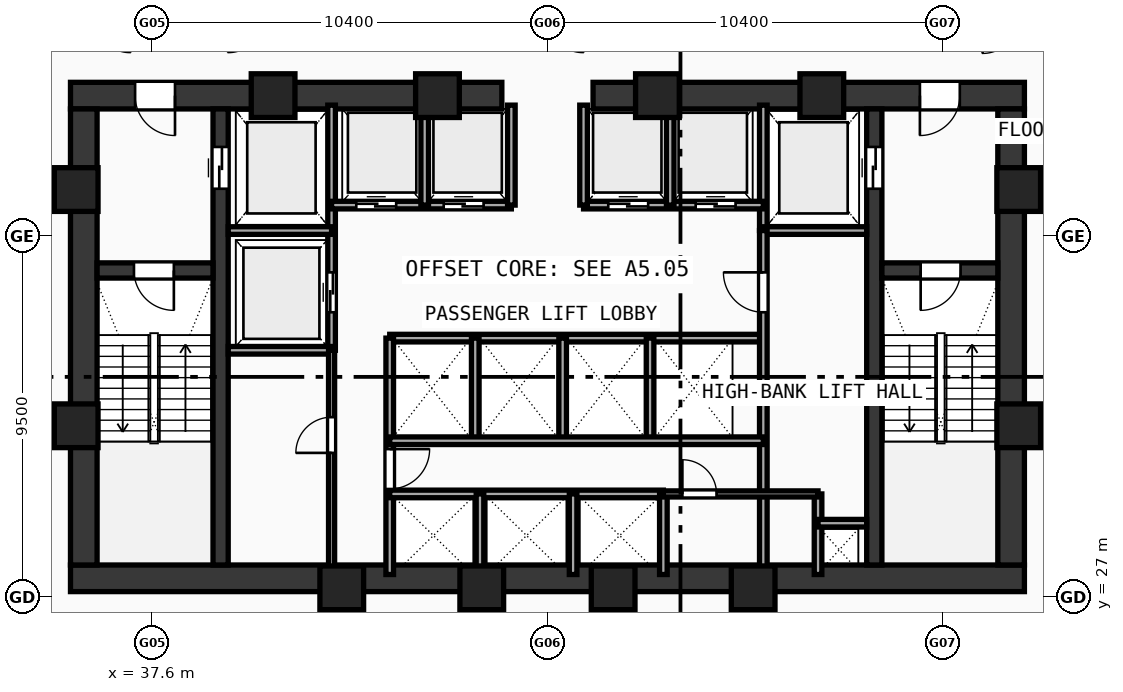
"""IFC4 building model, lengths in metres.
Left out: names, types, materials, properties, quantities, classifications, styles, units other than length and angle.
Written with IfcOpenShell. Run it as: python <this file> out.ifc"""

import sys

from ifc_helpers import new_model, si_unit, direction, frame, frame_2d, origin, origin_with_axes, origin_2d, place, context, subcontext, project, spatial, rectangle, hollow_rectangle, extrude, source, transform, mapped, element, fill, save


model = new_model("IFC4")
c1 = context("Model", 3, precision=1e-05, world=origin(), true_north=direction((0.0, 1.0)))
c2 = subcontext(c1, "Body", "Model", "MODEL_VIEW")
j1 = project(units=[si_unit("LENGTHUNIT", "METRE"), si_unit("PLANEANGLEUNIT", "RADIAN")], contexts=[c1])
p1 = place(None, origin())
s1 = spatial("IfcSite", under=j1, at=p1, CompositionType="ELEMENT")
p2 = place(p1, origin())
s2 = spatial("IfcBuilding", under=s1, at=p2, CompositionType="ELEMENT")
p3 = place(p2, frame((0.0, 0.0, 30.4)))
s3 = spatial("IfcBuildingStorey", under=s2, at=p3, CompositionType="ELEMENT", Elevation=30.4)
p4 = place(p3, frame((35.45, 27.5, 0.0), z_axis=(0.0, 0.0, 1.0), x_axis=(1.0, 0.0, 0.0)))
e1 = element("IfcWall", 1, at=p4, inside=s3, PredefinedType="SHEAR", context=c2, shape_type="SweptSolid", body=[
    extrude(rectangle(XDim=25.1, YDim=0.7, at=frame_2d((12.55, 0.0))), origin(), (0.0, 0.0, 1.0), 3.37),
])
p5 = place(p3, frame((35.45, 40.2, 0.0), z_axis=(0.0, 0.0, 1.0), x_axis=(1.0, 0.0, 0.0)))
e2 = element("IfcWall", 2, at=p5, inside=s3, PredefinedType="SHEAR", context=c2, shape_type="SweptSolid", body=[
    extrude(rectangle(XDim=11.35, YDim=0.7, at=frame_2d((5.675, 0.0))), origin(), (0.0, 0.0, 1.0), 3.37),
])
p6 = place(p5, frame((1.7, 0.0, 0.0)))
e3 = element("IfcOpeningElement", 3, at=p6, cuts=e2, PredefinedType="OPENING", context=c2, shape_type="SweptSolid", body=[
    extrude(rectangle(XDim=1.05, YDim=2.1, at=frame_2d((0.525, 1.05))), frame((0.0, 0.36, 0.0), z_axis=(0.0, -1.0, 0.0), x_axis=(1.0, 0.0, 0.0)), (0.0, 0.0, 1.0), 0.72),
])
p7 = place(p3, frame((49.2, 40.2, 0.0), z_axis=(0.0, 0.0, 1.0), x_axis=(1.0, 0.0, 0.0)))
e4 = element("IfcWall", 4, at=p7, inside=s3, PredefinedType="SHEAR", context=c2, shape_type="SweptSolid", body=[
    extrude(rectangle(XDim=11.35, YDim=0.7, at=frame_2d((5.675, 0.0))), origin(), (0.0, 0.0, 1.0), 3.37),
])
p8 = place(p7, frame((8.6, 0.0, 0.0)))
e5 = element("IfcOpeningElement", 5, at=p8, cuts=e4, PredefinedType="OPENING", context=c2, shape_type="SweptSolid", body=[
    extrude(rectangle(XDim=1.05, YDim=2.1, at=frame_2d((0.525, 1.05))), frame((0.0, 0.36, 0.0), z_axis=(0.0, -1.0, 0.0), x_axis=(1.0, 0.0, 0.0)), (0.0, 0.0, 1.0), 0.72),
])
for number, where, z_axis, x_axis in (
    (6, (35.8, 27.85, 0.0), (0.0, 0.0, 1.0), (0.0, 1.0, 0.0)),
    (7, (60.2, 27.85, 0.0), (0.0, 0.0, 1.0), (0.0, 1.0, 0.0)),
):
    element("IfcWall", number, at=place(p3, frame(where, z_axis=z_axis, x_axis=x_axis)), inside=s3, PredefinedType="SHEAR", context=c2, shape_type="SweptSolid", body=[
        extrude(rectangle(XDim=12.0, YDim=0.7, at=frame_2d((6.0, 0.0))), origin(), (0.0, 0.0, 1.0), 3.37),
    ])
p9 = place(p3, frame((39.4, 27.85, 0.0), z_axis=(0.0, 0.0, 1.0), x_axis=(0.0, 1.0, 0.0)))
e8 = element("IfcWall", 8, at=p9, inside=s3, PredefinedType="SHEAR", context=c2, shape_type="SweptSolid", body=[
    extrude(rectangle(XDim=12.0, YDim=0.4, at=frame_2d((6.0, 0.0))), origin(), (0.0, 0.0, 1.0), 3.37),
])
p10 = place(p9, frame((9.9, 0.0, 0.0)))
e9 = element("IfcOpeningElement", 9, at=p10, cuts=e8, PredefinedType="OPENING", context=c2, shape_type="SweptSolid", body=[
    extrude(rectangle(XDim=1.1, YDim=2.1, at=frame_2d((0.55, 1.05))), frame((0.0, 0.21, 0.0), z_axis=(0.0, -1.0, 0.0), x_axis=(1.0, 0.0, 0.0)), (0.0, 0.0, 1.0), 0.42),
])
p11 = place(p3, frame((56.6, 27.85, 0.0), z_axis=(0.0, 0.0, 1.0), x_axis=(0.0, 1.0, 0.0)))
e10 = element("IfcWall", 10, at=p11, inside=s3, PredefinedType="SHEAR", context=c2, shape_type="SweptSolid", body=[
    extrude(rectangle(XDim=12.0, YDim=0.4, at=frame_2d((6.0, 0.0))), origin(), (0.0, 0.0, 1.0), 3.37),
])
p12 = place(p11, frame((9.9, 0.0, 0.0)))
e11 = element("IfcOpeningElement", 11, at=p12, cuts=e10, PredefinedType="OPENING", context=c2, shape_type="SweptSolid", body=[
    extrude(rectangle(XDim=1.1, YDim=2.1, at=frame_2d((0.55, 1.05))), frame((0.0, 0.21, 0.0), z_axis=(0.0, -1.0, 0.0), x_axis=(1.0, 0.0, 0.0)), (0.0, 0.0, 1.0), 0.42),
])
p13 = place(p3, frame((36.15, 35.6, 0.0), z_axis=(0.0, 0.0, 1.0), x_axis=(1.0, 0.0, 0.0)))
e12 = element("IfcWall", 12, at=p13, inside=s3, PredefinedType="SHEAR", context=c2, shape_type="SweptSolid", body=[
    extrude(rectangle(XDim=3.05, YDim=0.4, at=frame_2d((1.525, 0.0))), origin(), (0.0, 0.0, 1.0), 3.37),
])
p14 = place(p13, frame((0.97, 0.0, 0.0)))
e13 = element("IfcOpeningElement", 13, at=p14, cuts=e12, PredefinedType="OPENING", context=c2, shape_type="SweptSolid", body=[
    extrude(rectangle(XDim=1.05, YDim=2.1, at=frame_2d((0.525, 1.05))), frame((0.0, 0.21, 0.0), z_axis=(0.0, -1.0, 0.0), x_axis=(1.0, 0.0, 0.0)), (0.0, 0.0, 1.0), 0.42),
])
p15 = place(p3, frame((56.8, 35.6, 0.0), z_axis=(0.0, 0.0, 1.0), x_axis=(1.0, 0.0, 0.0)))
e14 = element("IfcWall", 14, at=p15, inside=s3, PredefinedType="SHEAR", context=c2, shape_type="SweptSolid", body=[
    extrude(rectangle(XDim=3.05, YDim=0.4, at=frame_2d((1.525, 0.0))), origin(), (0.0, 0.0, 1.0), 3.37),
])
p16 = place(p15, frame((1.02, 0.0, 0.0)))
e15 = element("IfcOpeningElement", 15, at=p16, cuts=e14, PredefinedType="OPENING", context=c2, shape_type="SweptSolid", body=[
    extrude(rectangle(XDim=1.05, YDim=2.1, at=frame_2d((0.525, 1.05))), frame((0.0, 0.21, 0.0), z_axis=(0.0, -1.0, 0.0), x_axis=(1.0, 0.0, 0.0)), (0.0, 0.0, 1.0), 0.42),
])
m1 = source(origin(), c2, "Body", "SweptSolid", [
    extrude(hollow_rectangle(XDim=1.15, YDim=1.15, WallThickness=0.048, at=origin_2d()), origin(), (0.0, 0.0, 1.0), 3.63),
])
for number, where, z_axis, x_axis in (
    (16, (42.588, 27.25, -0.26), (0.0, 0.0, 1.0), (1.0, 0.0, 0.0)),
    (17, (46.272, 27.25, -0.26), (0.0, 0.0, 1.0), (1.0, 0.0, 0.0)),
    (18, (49.729, 27.25, -0.26), (0.0, 0.0, 1.0), (1.0, 0.0, 0.0)),
    (19, (53.412, 27.25, -0.26), (0.0, 0.0, 1.0), (1.0, 0.0, 0.0)),
    (20, (60.4, 31.513, -0.26), (0.0, 0.0, 1.0), (1.0, 0.0, 0.0)),
    (21, (60.4, 37.729, -0.26), (0.0, 0.0, 1.0), (1.0, 0.0, 0.0)),
    (22, (55.219, 40.2, -0.26), (0.0, 0.0, 1.0), (1.0, 0.0, 0.0)),
    (23, (50.894, 40.2, -0.26), (0.0, 0.0, 1.0), (1.0, 0.0, 0.0)),
    (24, (45.106, 40.2, -0.26), (0.0, 0.0, 1.0), (1.0, 0.0, 0.0)),
    (25, (40.781, 40.2, -0.26), (0.0, 0.0, 1.0), (1.0, 0.0, 0.0)),
    (26, (35.6, 37.729, -0.26), (0.0, 0.0, 1.0), (1.0, 0.0, 0.0)),
    (27, (35.6, 31.513, -0.26), (0.0, 0.0, 1.0), (1.0, 0.0, 0.0)),
):
    element("IfcColumn", number, at=place(p3, frame(where, z_axis=z_axis, x_axis=x_axis)), inside=s3, PredefinedType="COLUMN", context=c2, shape_type="MappedRepresentation", body=[
        mapped(m1, transform((0.0, 0.0, 0.0), scale=1.0)),
    ])
p17 = place(p3, frame((42.32, 33.5, 0.0), z_axis=(0.0, 0.0, 1.0), x_axis=(0.0, 1.0, 0.0)))
e28 = element("IfcWall", 28, at=p17, inside=s3, PredefinedType="SOLIDWALL", context=c2, shape_type="SweptSolid", body=[
    extrude(rectangle(XDim=6.45, YDim=0.2, at=frame_2d((3.225, 0.0))), origin(), (0.0, 0.0, 1.0), 3.37),
])
p18 = place(p17, frame((1.0, 0.0, 0.0)))
e29 = element("IfcOpeningElement", 29, at=p18, cuts=e28, PredefinedType="OPENING", context=c2, shape_type="SweptSolid", body=[
    extrude(rectangle(XDim=1.05, YDim=2.1, at=frame_2d((0.525, 1.05))), frame((0.0, 0.11, 0.0), z_axis=(0.0, -1.0, 0.0), x_axis=(1.0, 0.0, 0.0)), (0.0, 0.0, 1.0), 0.22),
])
for number, where, z_axis, x_axis in (
    (30, (39.6, 36.65, 0.0), (0.0, 0.0, 1.0), (1.0, 0.0, 0.0)),
    (31, (39.6, 33.5, 0.0), (0.0, 0.0, 1.0), (1.0, 0.0, 0.0)),
):
    element("IfcWall", number, at=place(p3, frame(where, z_axis=z_axis, x_axis=x_axis)), inside=s3, PredefinedType="SOLIDWALL", context=c2, shape_type="SweptSolid", body=[
        extrude(rectangle(XDim=2.72, YDim=0.2, at=frame_2d((1.36, 0.0))), origin(), (0.0, 0.0, 1.0), 3.37),
    ])
p19 = place(p3, frame((53.68, 36.65, 0.0), z_axis=(0.0, 0.0, 1.0), x_axis=(0.0, 1.0, 0.0)))
e32 = element("IfcWall", 32, at=p19, inside=s3, PredefinedType="SOLIDWALL", context=c2, shape_type="SweptSolid", body=[
    extrude(rectangle(XDim=3.3, YDim=0.2, at=frame_2d((1.65, 0.0))), origin(), (0.0, 0.0, 1.0), 3.37),
])
p20 = place(p3, frame((53.68, 36.65, 0.0), z_axis=(0.0, 0.0, 1.0), x_axis=(1.0, 0.0, 0.0)))
e33 = element("IfcWall", 33, at=p20, inside=s3, PredefinedType="SOLIDWALL", context=c2, shape_type="SweptSolid", body=[
    extrude(rectangle(XDim=2.72, YDim=0.2, at=frame_2d((1.36, 0.0))), origin(), (0.0, 0.0, 1.0), 3.37),
])
p21 = place(p3, frame((42.32, 37.32, 0.0), z_axis=(0.0, 0.0, 1.0), x_axis=(1.0, 0.0, 0.0)))
e34 = element("IfcWall", 34, at=p21, inside=s3, PredefinedType="SOLIDWALL", context=c2, shape_type="SweptSolid", body=[
    extrude(rectangle(XDim=4.73, YDim=0.2, at=frame_2d((2.365, 0.0))), origin(), (0.0, 0.0, 1.0), 3.37),
])
p22 = place(p21, frame((0.65, 0.0, 0.0)))
e35 = element("IfcOpeningElement", 35, at=p22, cuts=e34, PredefinedType="OPENING", context=c2, shape_type="SweptSolid", body=[
    extrude(rectangle(XDim=1.05, YDim=2.1, at=frame_2d((0.525, 1.05))), frame((0.0, 0.11, 0.0), z_axis=(0.0, -1.0, 0.0), x_axis=(1.0, 0.0, 0.0)), (0.0, 0.0, 1.0), 0.22),
])
p23 = place(p21, frame((2.95, 0.0, 0.0)))
e36 = element("IfcOpeningElement", 36, at=p23, cuts=e34, PredefinedType="OPENING", context=c2, shape_type="SweptSolid", body=[
    extrude(rectangle(XDim=1.05, YDim=2.1, at=frame_2d((0.525, 1.05))), frame((0.0, 0.11, 0.0), z_axis=(0.0, -1.0, 0.0), x_axis=(1.0, 0.0, 0.0)), (0.0, 0.0, 1.0), 0.22),
])
p24 = place(p3, frame((48.95, 37.32, 0.0), z_axis=(0.0, 0.0, 1.0), x_axis=(1.0, 0.0, 0.0)))
e37 = element("IfcWall", 37, at=p24, inside=s3, PredefinedType="SOLIDWALL", context=c2, shape_type="SweptSolid", body=[
    extrude(rectangle(XDim=4.73, YDim=0.2, at=frame_2d((2.365, 0.0))), origin(), (0.0, 0.0, 1.0), 3.37),
])
p25 = place(p24, frame((0.65, 0.0, 0.0)))
e38 = element("IfcOpeningElement", 38, at=p25, cuts=e37, PredefinedType="OPENING", context=c2, shape_type="SweptSolid", body=[
    extrude(rectangle(XDim=1.05, YDim=2.1, at=frame_2d((0.525, 1.05))), frame((0.0, 0.11, 0.0), z_axis=(0.0, -1.0, 0.0), x_axis=(1.0, 0.0, 0.0)), (0.0, 0.0, 1.0), 0.22),
])
p26 = place(p24, frame((2.95, 0.0, 0.0)))
e39 = element("IfcOpeningElement", 39, at=p26, cuts=e37, PredefinedType="OPENING", context=c2, shape_type="SweptSolid", body=[
    extrude(rectangle(XDim=1.05, YDim=2.1, at=frame_2d((0.525, 1.05))), frame((0.0, 0.11, 0.0), z_axis=(0.0, -1.0, 0.0), x_axis=(1.0, 0.0, 0.0)), (0.0, 0.0, 1.0), 0.22),
])
for number, where, z_axis, x_axis in (
    (40, (47.05, 37.32, 0.0), (0.0, 0.0, 1.0), (0.0, 1.0, 0.0)),
    (41, (48.95, 37.32, 0.0), (0.0, 0.0, 1.0), (0.0, 1.0, 0.0)),
    (42, (44.77, 37.32, 0.0), (0.0, 0.0, 1.0), (0.0, 1.0, 0.0)),
    (43, (51.23, 37.32, 0.0), (0.0, 0.0, 1.0), (0.0, 1.0, 0.0)),
):
    element("IfcWall", number, at=place(p3, frame(where, z_axis=z_axis, x_axis=x_axis)), inside=s3, PredefinedType="SOLIDWALL", context=c2, shape_type="SweptSolid", body=[
        extrude(rectangle(XDim=2.63, YDim=0.2, at=frame_2d((1.315, 0.0))), origin(), (0.0, 0.0, 1.0), 3.37),
    ])
p27 = place(p3, frame((43.85, 33.82, 0.0), z_axis=(0.0, 0.0, 1.0), x_axis=(1.0, 0.0, 0.0)))
e44 = element("IfcWall", 44, at=p27, inside=s3, PredefinedType="SOLIDWALL", context=c2, shape_type="SweptSolid", body=[
    extrude(rectangle(XDim=9.83, YDim=0.2, at=frame_2d((4.915, 0.0))), origin(), (0.0, 0.0, 1.0), 3.37),
])
p28 = place(p3, frame((43.85, 27.6, 0.0), z_axis=(0.0, 0.0, 1.0), x_axis=(0.0, 1.0, 0.0)))
e45 = element("IfcWall", 45, at=p28, inside=s3, PredefinedType="SOLIDWALL", context=c2, shape_type="SweptSolid", body=[
    extrude(rectangle(XDim=6.22, YDim=0.2, at=frame_2d((3.11, 0.0))), origin(), (0.0, 0.0, 1.0), 3.37),
])
p29 = place(p28, frame((2.25, 0.0, 0.0)))
e46 = element("IfcOpeningElement", 46, at=p29, cuts=e45, PredefinedType="OPENING", context=c2, shape_type="SweptSolid", body=[
    extrude(rectangle(XDim=1.05, YDim=2.1, at=frame_2d((0.525, 1.05))), frame((0.0, 0.11, 0.0), z_axis=(0.0, -1.0, 0.0), x_axis=(1.0, 0.0, 0.0)), (0.0, 0.0, 1.0), 0.22),
])
p30 = place(p3, frame((53.68, 27.6, 0.0), z_axis=(0.0, 0.0, 1.0), x_axis=(0.0, 1.0, 0.0)))
e47 = element("IfcWall", 47, at=p30, inside=s3, PredefinedType="SOLIDWALL", context=c2, shape_type="SweptSolid", body=[
    extrude(rectangle(XDim=9.05, YDim=0.2, at=frame_2d((4.525, 0.0))), origin(), (0.0, 0.0, 1.0), 3.37),
])
p31 = place(p30, frame((6.9, 0.0, 0.0)))
e48 = element("IfcOpeningElement", 48, at=p31, cuts=e47, PredefinedType="OPENING", context=c2, shape_type="SweptSolid", body=[
    extrude(rectangle(XDim=1.05, YDim=2.1, at=frame_2d((0.525, 1.05))), frame((0.0, 0.11, 0.0), z_axis=(0.0, -1.0, 0.0), x_axis=(1.0, 0.0, 0.0)), (0.0, 0.0, 1.0), 0.22),
])
for number, where, z_axis, x_axis in (
    (49, (46.1, 31.12, 0.0), (0.0, 0.0, 1.0), (0.0, 1.0, 0.0)),
    (50, (48.4, 31.12, 0.0), (0.0, 0.0, 1.0), (0.0, 1.0, 0.0)),
    (51, (50.7, 31.12, 0.0), (0.0, 0.0, 1.0), (0.0, 1.0, 0.0)),
):
    element("IfcWall", number, at=place(p3, frame(where, z_axis=z_axis, x_axis=x_axis)), inside=s3, PredefinedType="SOLIDWALL", context=c2, shape_type="SweptSolid", body=[
        extrude(rectangle(XDim=2.7, YDim=0.2, at=frame_2d((1.35, 0.0))), origin(), (0.0, 0.0, 1.0), 3.37),
    ])
p32 = place(p3, frame((43.85, 29.72, 0.0), z_axis=(0.0, 0.0, 1.0), x_axis=(1.0, 0.0, 0.0)))
e52 = element("IfcWall", 52, at=p32, inside=s3, PredefinedType="SOLIDWALL", context=c2, shape_type="SweptSolid", body=[
    extrude(rectangle(XDim=7.2, YDim=0.2, at=frame_2d((3.6, 0.0))), origin(), (0.0, 0.0, 1.0), 3.37),
])
p33 = place(p3, frame((51.05, 27.6, 0.0), z_axis=(0.0, 0.0, 1.0), x_axis=(0.0, 1.0, 0.0)))
e53 = element("IfcWall", 53, at=p33, inside=s3, PredefinedType="SOLIDWALL", context=c2, shape_type="SweptSolid", body=[
    extrude(rectangle(XDim=2.12, YDim=0.2, at=frame_2d((1.06, 0.0))), origin(), (0.0, 0.0, 1.0), 3.37),
])
p34 = place(p3, frame((43.85, 31.12, 0.0), z_axis=(0.0, 0.0, 1.0), x_axis=(1.0, 0.0, 0.0)))
e54 = element("IfcWall", 54, at=p34, inside=s3, PredefinedType="SOLIDWALL", context=c2, shape_type="SweptSolid", body=[
    extrude(rectangle(XDim=9.83, YDim=0.2, at=frame_2d((4.915, 0.0))), origin(), (0.0, 0.0, 1.0), 3.37),
])
for number, where, z_axis, x_axis in (
    (55, (46.225, 27.6, 0.0), (0.0, 0.0, 1.0), (0.0, 1.0, 0.0)),
    (56, (48.675, 27.6, 0.0), (0.0, 0.0, 1.0), (0.0, 1.0, 0.0)),
    (57, (55.12, 27.6, 0.0), (0.0, 0.0, 1.0), (0.0, 1.0, 0.0)),
):
    element("IfcWall", number, at=place(p3, frame(where, z_axis=z_axis, x_axis=x_axis)), inside=s3, PredefinedType="SOLIDWALL", context=c2, shape_type="SweptSolid", body=[
        extrude(rectangle(XDim=2.12, YDim=0.2, at=frame_2d((1.06, 0.0))), origin(), (0.0, 0.0, 1.0), 3.37),
    ])
p35 = place(p3, frame((55.12, 28.95, 0.0), z_axis=(0.0, 0.0, 1.0), x_axis=(1.0, 0.0, 0.0)))
e58 = element("IfcWall", 58, at=p35, inside=s3, PredefinedType="SOLIDWALL", context=c2, shape_type="SweptSolid", body=[
    extrude(rectangle(XDim=1.28, YDim=0.2, at=frame_2d((0.64, 0.0))), origin(), (0.0, 0.0, 1.0), 3.37),
])
p36 = place(p3, frame((42.32, 27.6, 0.0), z_axis=(0.0, 0.0, 1.0), x_axis=(0.0, 1.0, 0.0)))
e59 = element("IfcWall", 59, at=p36, inside=s3, PredefinedType="PARTITIONING", context=c2, shape_type="SweptSolid", body=[
    extrude(rectangle(XDim=5.9, YDim=0.16, at=frame_2d((2.95, 0.0))), origin(), (0.0, 0.0, 1.0), 3.37),
])
p37 = place(p36, frame((3.2, 0.0, 0.0)))
e60 = element("IfcOpeningElement", 60, at=p37, cuts=e59, PredefinedType="OPENING", context=c2, shape_type="SweptSolid", body=[
    extrude(rectangle(XDim=0.94, YDim=2.1, at=frame_2d((0.47, 1.05))), frame((0.0, 0.09, 0.0), z_axis=(0.0, -1.0, 0.0), x_axis=(1.0, 0.0, 0.0)), (0.0, 0.0, 1.0), 0.18),
])
p38 = place(p3, frame((51.05, 29.72, 0.0), z_axis=(0.0, 0.0, 1.0), x_axis=(1.0, 0.0, 0.0)))
e61 = element("IfcWall", 61, at=p38, inside=s3, PredefinedType="PARTITIONING", context=c2, shape_type="SweptSolid", body=[
    extrude(rectangle(XDim=4.07, YDim=0.16, at=frame_2d((2.035, 0.0))), origin(), (0.0, 0.0, 1.0), 3.37),
])
p39 = place(p38, frame((0.5, 0.0, 0.0)))
e62 = element("IfcOpeningElement", 62, at=p39, cuts=e61, PredefinedType="OPENING", context=c2, shape_type="SweptSolid", body=[
    extrude(rectangle(XDim=0.9, YDim=2.1, at=frame_2d((0.45, 1.05))), frame((0.0, 0.09, 0.0), z_axis=(0.0, -1.0, 0.0), x_axis=(1.0, 0.0, 0.0)), (0.0, 0.0, 1.0), 0.18),
])
m2 = source(origin(), c2, "Body", "SweptSolid", [
    extrude(rectangle(XDim=1.05, YDim=2.1, at=frame_2d((0.525, 1.05))), frame((0.0, 0.025, 0.0), z_axis=(0.0, -1.0, 0.0), x_axis=(1.0, 0.0, 0.0)), (0.0, 0.0, 1.0), 0.05),
])
p40 = place(p14, frame((1.05, 0.0, 0.0), z_axis=(0.0, 0.0, 1.0), x_axis=(-1.0, 0.0, 0.0)))
e63 = element("IfcDoor", 63, at=p40, inside=s3, OperationType="SINGLE_SWING_LEFT", PredefinedType="DOOR", context=c2, shape_type="MappedRepresentation", body=[
    mapped(m2, transform((0.0, 0.0, 0.0), scale=1.0)),
])
fill(e13, e63)
p41 = place(p16, frame((1.05, 0.0, 0.0), z_axis=(0.0, 0.0, 1.0), x_axis=(-1.0, 0.0, 0.0)))
e64 = element("IfcDoor", 64, at=p41, inside=s3, OperationType="SINGLE_SWING_RIGHT", PredefinedType="DOOR", context=c2, shape_type="MappedRepresentation", body=[
    mapped(m2, transform((0.0, 0.0, 0.0), scale=1.0)),
])
fill(e15, e64)
p42 = place(p6, frame((1.05, 0.0, 0.0), z_axis=(0.0, 0.0, 1.0), x_axis=(-1.0, 0.0, 0.0)))
e65 = element("IfcDoor", 65, at=p42, inside=s3, OperationType="SINGLE_SWING_LEFT", PredefinedType="DOOR", context=c2, shape_type="MappedRepresentation", body=[
    mapped(m2, transform((0.0, 0.0, 0.0), scale=1.0)),
])
fill(e3, e65)
p43 = place(p8, frame((1.05, 0.0, 0.0), z_axis=(0.0, 0.0, 1.0), x_axis=(-1.0, 0.0, 0.0)))
e66 = element("IfcDoor", 66, at=p43, inside=s3, OperationType="SINGLE_SWING_RIGHT", PredefinedType="DOOR", context=c2, shape_type="MappedRepresentation", body=[
    mapped(m2, transform((0.0, 0.0, 0.0), scale=1.0)),
])
fill(e5, e66)
m3 = source(origin(), c2, "Body", "SweptSolid", [
    extrude(rectangle(XDim=1.1, YDim=2.1, at=frame_2d((0.55, 1.05))), frame((0.0, 0.025, 0.0), z_axis=(0.0, -1.0, 0.0), x_axis=(1.0, 0.0, 0.0)), (0.0, 0.0, 1.0), 0.05),
])
p44 = place(p10, frame((1.1, 0.0, 0.0), z_axis=(0.0, 0.0, 1.0), x_axis=(-1.0, 0.0, 0.0)))
e67 = element("IfcDoor", 67, at=p44, inside=s3, OperationType="DOUBLE_DOOR_SLIDING", PredefinedType="DOOR", context=c2, shape_type="MappedRepresentation", body=[
    mapped(m3, transform((0.0, 0.0, 0.0), scale=1.0)),
])
fill(e9, e67)
p45 = place(p12, origin_with_axes())
e68 = element("IfcDoor", 68, at=p45, inside=s3, OperationType="DOUBLE_DOOR_SLIDING", PredefinedType="DOOR", context=c2, shape_type="MappedRepresentation", body=[
    mapped(m3, transform((0.0, 0.0, 0.0), scale=1.0)),
])
fill(e11, e68)
p46 = place(p18, origin_with_axes())
e69 = element("IfcDoor", 69, at=p46, inside=s3, OperationType="DOUBLE_DOOR_SLIDING", PredefinedType="DOOR", context=c2, shape_type="MappedRepresentation", body=[
    mapped(m2, transform((0.0, 0.0, 0.0), scale=1.0)),
])
fill(e29, e69)
p47 = place(p22, frame((1.05, 0.0, 0.0), z_axis=(0.0, 0.0, 1.0), x_axis=(-1.0, 0.0, 0.0)))
e70 = element("IfcDoor", 70, at=p47, inside=s3, OperationType="DOUBLE_DOOR_SLIDING", PredefinedType="DOOR", context=c2, shape_type="MappedRepresentation", body=[
    mapped(m2, transform((0.0, 0.0, 0.0), scale=1.0)),
])
fill(e35, e70)
p48 = place(p23, frame((1.05, 0.0, 0.0), z_axis=(0.0, 0.0, 1.0), x_axis=(-1.0, 0.0, 0.0)))
e71 = element("IfcDoor", 71, at=p48, inside=s3, OperationType="DOUBLE_DOOR_SLIDING", PredefinedType="DOOR", context=c2, shape_type="MappedRepresentation", body=[
    mapped(m2, transform((0.0, 0.0, 0.0), scale=1.0)),
])
fill(e36, e71)
p49 = place(p25, frame((1.05, 0.0, 0.0), z_axis=(0.0, 0.0, 1.0), x_axis=(-1.0, 0.0, 0.0)))
e72 = element("IfcDoor", 72, at=p49, inside=s3, OperationType="DOUBLE_DOOR_SLIDING", PredefinedType="DOOR", context=c2, shape_type="MappedRepresentation", body=[
    mapped(m2, transform((0.0, 0.0, 0.0), scale=1.0)),
])
fill(e38, e72)
p50 = place(p26, frame((1.05, 0.0, 0.0), z_axis=(0.0, 0.0, 1.0), x_axis=(-1.0, 0.0, 0.0)))
e73 = element("IfcDoor", 73, at=p50, inside=s3, OperationType="DOUBLE_DOOR_SLIDING", PredefinedType="DOOR", context=c2, shape_type="MappedRepresentation", body=[
    mapped(m2, transform((0.0, 0.0, 0.0), scale=1.0)),
])
fill(e39, e73)
p51 = place(p29, frame((1.05, 0.0, 0.0), z_axis=(0.0, 0.0, 1.0), x_axis=(-1.0, 0.0, 0.0)))
e74 = element("IfcDoor", 74, at=p51, inside=s3, OperationType="SINGLE_SWING_LEFT", PredefinedType="DOOR", context=c2, shape_type="MappedRepresentation", body=[
    mapped(m2, transform((0.0, 0.0, 0.0), scale=1.0)),
])
fill(e46, e74)
p52 = place(p31, origin_with_axes())
e75 = element("IfcDoor", 75, at=p52, inside=s3, OperationType="SINGLE_SWING_RIGHT", PredefinedType="DOOR", context=c2, shape_type="MappedRepresentation", body=[
    mapped(m2, transform((0.0, 0.0, 0.0), scale=1.0)),
])
fill(e48, e75)
m4 = source(origin(), c2, "Body", "SweptSolid", [
    extrude(rectangle(XDim=0.94, YDim=2.1, at=frame_2d((0.47, 1.05))), frame((0.0, 0.025, 0.0), z_axis=(0.0, -1.0, 0.0), x_axis=(1.0, 0.0, 0.0)), (0.0, 0.0, 1.0), 0.05),
])
p53 = place(p37, origin_with_axes())
e76 = element("IfcDoor", 76, at=p53, inside=s3, OperationType="SINGLE_SWING_LEFT", PredefinedType="DOOR", context=c2, shape_type="MappedRepresentation", body=[
    mapped(m4, transform((0.0, 0.0, 0.0), scale=1.0)),
])
fill(e60, e76)
m5 = source(origin(), c2, "Body", "SweptSolid", [
    extrude(rectangle(XDim=0.9, YDim=2.1, at=frame_2d((0.45, 1.05))), frame((0.0, 0.025, 0.0), z_axis=(0.0, -1.0, 0.0), x_axis=(1.0, 0.0, 0.0)), (0.0, 0.0, 1.0), 0.05),
])
p54 = place(p39, origin_with_axes())
e77 = element("IfcDoor", 77, at=p54, inside=s3, OperationType="SINGLE_SWING_LEFT", PredefinedType="DOOR", context=c2, shape_type="MappedRepresentation", body=[
    mapped(m5, transform((0.0, 0.0, 0.0), scale=1.0)),
])
fill(e62, e77)
save(model, sys.argv[1])
